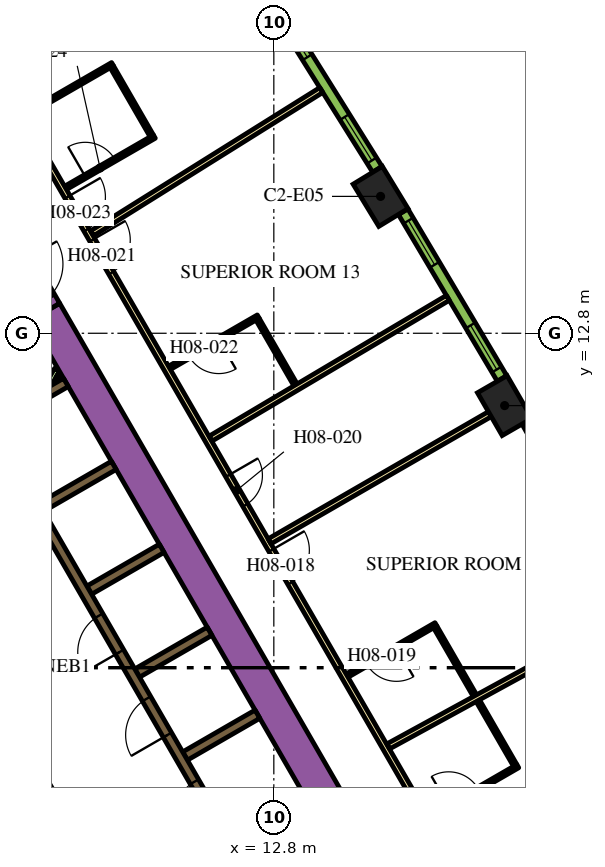
"""IFC4 building model, lengths in metres.
Left out: names, types, materials, properties, quantities, classifications, styles, units other than length and angle.
Written with IfcOpenShell. Run it as: python <this file> out.ifc"""

import sys

from ifc_helpers import new_model, si_unit, direction, frame, frame_2d, origin, origin_2d, place, context, subcontext, project, spatial, polyline, rectangle, outline, extrude, element, fill, save


model = new_model("IFC4")
c1 = context("Model", 3, precision=1e-05, world=origin(), true_north=direction((0.0, 1.0)))
c2 = subcontext(c1, "Body", "Model", "MODEL_VIEW")
j1 = project(units=[si_unit("LENGTHUNIT", "METRE"), si_unit("PLANEANGLEUNIT", "RADIAN")], contexts=[c1])
p1 = place(None, origin())
s1 = spatial("IfcSite", under=j1, at=p1, CompositionType="ELEMENT")
p2 = place(p1, origin())
s2 = spatial("IfcBuilding", under=s1, at=p2, CompositionType="ELEMENT")
p3 = place(p2, frame((0.0, 0.0, 114.9)))
s3 = spatial("IfcBuildingStorey", under=s2, at=p3, CompositionType="ELEMENT", Elevation=114.9)
for number, where, z_axis, x_axis in (
    (1, (18.874, 10.897, 0.0), (0.0, 0.0, 1.0), (-0.5, 0.866, 0.0)),
    (2, (15.609, 16.402, 0.0), (0.0, 0.0, 1.0), (-0.52, 0.854, 0.0)),
):
    element("IfcColumn", number, at=place(p3, frame(where, z_axis=z_axis, x_axis=x_axis)), inside=s3, PredefinedType="COLUMN", context=c2, shape_type="SweptSolid", body=[
        extrude(rectangle(XDim=1.3, YDim=0.9, at=origin_2d()), origin(), (0.0, 0.0, 1.0), 3.9),
    ])
p4 = place(p3, frame((6.776, 13.364, 0.0), z_axis=(0.0, 0.0, 1.0), x_axis=(0.500004177138, -0.8660229921, 0.0)))
e3 = element("IfcWall", 3, at=p4, inside=s3, PredefinedType="SOLIDWALL", context=c2, shape_type="SweptSolid", body=[
    extrude(rectangle(XDim=20.204, YDim=0.9, at=frame_2d((10.102, 0.0))), origin(), (0.0, 0.0, 1.0), 3.9),
])
for number, where, z_axis, x_axis in (
    (4, (10.464, 1.677, 0.0), (0.0, 0.0, 1.0), (0.866, 0.5, 0.0)),
    (5, (9.204, 3.859, 0.0), (0.0, 0.0, 1.0), (0.866, 0.5, 0.0)),
    (6, (7.944, 6.041, 0.0), (0.0, 0.0, 1.0), (0.866, 0.5, 0.0)),
    (7, (6.684, 8.224, 0.0), (0.0, 0.0, 1.0), (0.866, 0.5, 0.0)),
):
    element("IfcWall", number, at=place(p3, frame(where, z_axis=z_axis, x_axis=x_axis)), inside=s3, PredefinedType="SOLIDWALL", context=c2, shape_type="SweptSolid", body=[
        extrude(rectangle(XDim=2.2, YDim=0.25, at=frame_2d((1.1, 0.0))), origin(), (0.0, 0.0, 1.0), 3.9),
    ])
p5 = place(p3, origin())
e8 = element("IfcWall", 8, at=p5, inside=s3, PredefinedType="SOLIDWALL", context=c2, shape_type="SweptSolid", body=[
    extrude(outline(polyline([(5.27, 10.173), (5.27, 10.173), (4.683, 9.834), (4.504, 9.731), (4.442, 9.839), (4.431, 9.856), (4.419, 9.871), (4.406, 9.885), (4.39, 9.898), (4.374, 9.909), (4.357, 9.918), (4.341, 9.925), (7.266, 11.614), (7.391, 11.398), (5.486, 10.298), (5.486, 10.298), (5.27, 10.173), (5.27, 10.173)])), origin(), (0.0, 0.0, 1.0), 3.9),
])
p6 = place(p3, frame((6.872, 11.45, 0.0), z_axis=(0.0, 0.0, 1.0), x_axis=(0.499846793097, 0.866113839764, 0.0)))
e9 = element("IfcWall", 9, at=p6, inside=s3, PredefinedType="PARTITIONING", context=c2, shape_type="SweptSolid", body=[
    extrude(rectangle(XDim=0.453, YDim=0.15, at=frame_2d((0.227, 0.0))), origin(), (0.0, 0.0, 1.0), 2.75),
])
p7 = place(p3, frame((7.131, 11.6, 0.0), z_axis=(0.0, 0.0, 1.0), x_axis=(0.498600033135, 0.866832167699, 0.0)))
e10 = element("IfcWall", 10, at=p7, inside=s3, PredefinedType="PARTITIONING", context=c2, shape_type="SweptSolid", body=[
    extrude(rectangle(XDim=0.107, YDim=0.15, at=frame_2d((0.053, 0.0))), origin(), (0.0, 0.0, 1.0), 2.75),
])
p8 = place(p3, frame((11.553, -0.46, 0.0), z_axis=(0.0, 0.0, 1.0), x_axis=(-0.500006514828, 0.866021642414, 0.0)))
e11 = element("IfcWall", 11, at=p8, inside=s3, PredefinedType="SOLIDWALL", context=c2, shape_type="SweptSolid", body=[
    extrude(rectangle(XDim=12.35, YDim=0.25, at=frame_2d((6.175, 0.0))), origin(), (0.0, 0.0, 1.0), 3.9),
])
p9 = place(p8, frame((0.585, 0.0, 0.0)))
e12 = element("IfcOpeningElement", 12, at=p9, cuts=e11, PredefinedType="OPENING", context=c2, shape_type="SweptSolid", body=[
    extrude(rectangle(XDim=1.1, YDim=2.1, at=frame_2d((0.55, 1.05))), frame((0.0, 0.135, 0.0), z_axis=(0.0, -1.0, 0.0), x_axis=(1.0, 0.0, 0.0)), (0.0, 0.0, 1.0), 0.27),
])
p10 = place(p8, frame((3.105, 0.0, 0.0)))
e13 = element("IfcOpeningElement", 13, at=p10, cuts=e11, PredefinedType="OPENING", context=c2, shape_type="SweptSolid", body=[
    extrude(rectangle(XDim=1.1, YDim=2.1, at=frame_2d((0.55, 1.05))), frame((0.0, 0.135, 0.0), z_axis=(0.0, -1.0, 0.0), x_axis=(1.0, 0.0, 0.0)), (0.0, 0.0, 1.0), 0.27),
])
p11 = place(p8, frame((5.625, 0.0, 0.0)))
e14 = element("IfcOpeningElement", 14, at=p11, cuts=e11, PredefinedType="OPENING", context=c2, shape_type="SweptSolid", body=[
    extrude(rectangle(XDim=1.1, YDim=2.1, at=frame_2d((0.55, 1.05))), frame((0.0, 0.135, 0.0), z_axis=(0.0, -1.0, 0.0), x_axis=(1.0, 0.0, 0.0)), (0.0, 0.0, 1.0), 0.27),
])
p12 = place(p3, frame((8.565, -2.185, 0.0), z_axis=(0.0, 0.0, 1.0), x_axis=(-0.499997954832, 0.866026584559, 0.0)))
e15 = element("IfcWall", 15, at=p12, inside=s3, PredefinedType="SOLIDWALL", context=c2, shape_type="SweptSolid", body=[
    extrude(rectangle(XDim=12.35, YDim=0.25, at=frame_2d((6.175, 0.0))), origin(), (0.0, 0.0, 1.0), 3.9),
])
p13 = place(p12, frame((5.725, 0.0, 0.0)))
e16 = element("IfcOpeningElement", 16, at=p13, cuts=e15, PredefinedType="OPENING", context=c2, shape_type="SweptSolid", body=[
    extrude(rectangle(XDim=0.9, YDim=2.1, at=frame_2d((0.45, 1.05))), frame((0.0, 0.135, 0.0), z_axis=(0.0, -1.0, 0.0), x_axis=(1.0, 0.0, 0.0)), (0.0, 0.0, 1.0), 0.27),
])
p14 = place(p3, frame((5.926, 14.836, 0.0), z_axis=(0.0, 0.0, 1.0), x_axis=(0.500062241894, -0.865989465428, 0.0)))
e17 = element("IfcWall", 17, at=p14, inside=s3, PredefinedType="SOLIDWALL", context=c2, shape_type="SweptSolid", body=[
    extrude(rectangle(XDim=1.7, YDim=0.9, at=frame_2d((0.85, 0.0))), origin(), (0.0, 0.0, 1.0), 3.9),
])
p15 = place(p14, frame((0.25, 0.0, 0.0)))
e18 = element("IfcOpeningElement", 18, at=p15, cuts=e17, PredefinedType="OPENING", context=c2, shape_type="SweptSolid", body=[
    extrude(rectangle(XDim=1.2, YDim=2.1, at=frame_2d((0.6, 1.05))), frame((0.0, 0.46, 0.0), z_axis=(0.0, -1.0, 0.0), x_axis=(1.0, 0.0, 0.0)), (0.0, 0.0, 1.0), 0.92),
])
p16 = place(p3, frame((6.163, 18.475, 0.0), z_axis=(0.0, 0.0, 1.0), x_axis=(0.500001317485, -0.866024643133, 0.0)))
e19 = element("IfcWall", 19, at=p16, inside=s3, PredefinedType="PARTITIONING", context=c2, shape_type="SweptSolid", body=[
    extrude(rectangle(XDim=25.767, YDim=0.15, at=frame_2d((12.883, 0.0))), origin(), (0.0, 0.0, 1.0), 2.75),
])
p17 = place(p16, frame((24.241, 0.0, 0.0)))
e20 = element("IfcOpeningElement", 20, at=p17, cuts=e19, PredefinedType="OPENING", context=c2, shape_type="SweptSolid", body=[
    extrude(rectangle(XDim=1.0, YDim=2.1, at=frame_2d((0.5, 1.05))), frame((0.0, 0.085, 0.0), z_axis=(0.0, -1.0, 0.0), x_axis=(1.0, 0.0, 0.0)), (0.0, 0.0, 1.0), 0.17),
])
p18 = place(p16, frame((13.144, 0.0, 0.0)))
e21 = element("IfcOpeningElement", 21, at=p18, cuts=e19, PredefinedType="OPENING", context=c2, shape_type="SweptSolid", body=[
    extrude(rectangle(XDim=1.0, YDim=2.1, at=frame_2d((0.5, 1.05))), frame((0.0, 0.085, 0.0), z_axis=(0.0, -1.0, 0.0), x_axis=(1.0, 0.0, 0.0)), (0.0, 0.0, 1.0), 0.17),
])
p19 = place(p16, frame((10.874, 0.0, 0.0)))
e22 = element("IfcOpeningElement", 22, at=p19, cuts=e19, PredefinedType="OPENING", context=c2, shape_type="SweptSolid", body=[
    extrude(rectangle(XDim=0.9, YDim=2.1, at=frame_2d((0.45, 1.05))), frame((0.0, 0.085, 0.0), z_axis=(0.0, -1.0, 0.0), x_axis=(1.0, 0.0, 0.0)), (0.0, 0.0, 1.0), 0.17),
])
p20 = place(p16, frame((3.718, 0.0, 0.0)))
e23 = element("IfcOpeningElement", 23, at=p20, cuts=e19, PredefinedType="OPENING", context=c2, shape_type="SweptSolid", body=[
    extrude(rectangle(XDim=1.0, YDim=2.1, at=frame_2d((0.5, 1.05))), frame((0.0, 0.085, 0.0), z_axis=(0.0, -1.0, 0.0), x_axis=(1.0, 0.0, 0.0)), (0.0, 0.0, 1.0), 0.17),
])
p21 = place(p16, frame((2.411, 0.0, 0.0)))
e24 = element("IfcOpeningElement", 24, at=p21, cuts=e19, PredefinedType="OPENING", context=c2, shape_type="SweptSolid", body=[
    extrude(rectangle(XDim=1.0, YDim=2.1, at=frame_2d((0.5, 1.05))), frame((0.0, 0.085, 0.0), z_axis=(0.0, -1.0, 0.0), x_axis=(1.0, 0.0, 0.0)), (0.0, 0.0, 1.0), 0.17),
])
p22 = place(p3, frame((10.592, 24.589, 0.0), z_axis=(0.0, 0.0, 1.0), x_axis=(-0.835337323748, -0.549737715236, 0.0)))
e25 = element("IfcWall", 25, at=p22, inside=s3, PredefinedType="PARTITIONING", context=c2, shape_type="SweptSolid", body=[
    extrude(rectangle(XDim=10.875, YDim=0.15, at=frame_2d((5.438, 0.0))), origin(), (0.0, 0.0, 1.0), 2.75),
])
p23 = place(p3, frame((14.049, 19.2, 0.0), z_axis=(0.0, 0.0, 1.0), x_axis=(-0.847955867271, -0.530066832731, 0.0)))
e26 = element("IfcWall", 26, at=p23, inside=s3, PredefinedType="PARTITIONING", context=c2, shape_type="SweptSolid", body=[
    extrude(rectangle(XDim=7.111, YDim=0.15, at=frame_2d((3.556, 0.0))), origin(), (0.0, 0.0, 1.0), 2.75),
])
p24 = place(p3, frame((17.379, 13.731, 0.0), z_axis=(0.0, 0.0, 1.0), x_axis=(-0.860132461691, -0.510070728768, 0.0)))
e27 = element("IfcWall", 27, at=p24, inside=s3, PredefinedType="PARTITIONING", context=c2, shape_type="SweptSolid", body=[
    extrude(rectangle(XDim=7.257, YDim=0.15, at=frame_2d((3.628, 0.0))), origin(), (0.0, 0.0, 1.0), 2.75),
])
p25 = place(p3, frame((18.484, 10.672, 0.0), z_axis=(0.0, 0.0, 1.0), x_axis=(-0.866019162053, -0.50001081084, 0.0)))
e28 = element("IfcWall", 28, at=p25, inside=s3, PredefinedType="PARTITIONING", context=c2, shape_type="SweptSolid", body=[
    extrude(rectangle(XDim=6.694, YDim=0.15, at=frame_2d((3.347, 0.0))), origin(), (0.0, 0.0, 1.0), 2.75),
])
p26 = place(p3, frame((21.614, 5.102, 0.0), z_axis=(0.0, 0.0, 1.0), x_axis=(-0.877484555087, -0.479604895287, 0.0)))
e29 = element("IfcWall", 29, at=p26, inside=s3, PredefinedType="PARTITIONING", context=c2, shape_type="SweptSolid", body=[
    extrude(rectangle(XDim=6.611, YDim=0.15, at=frame_2d((3.306, 0.0))), origin(), (0.0, 0.0, 1.0), 2.75),
])
p27 = place(p3, frame((16.881, 0.061, 0.0), z_axis=(0.0, 0.0, 1.0), x_axis=(0.866019956843, 0.50000943426, 0.0)))
e30 = element("IfcWall", 30, at=p27, inside=s3, PredefinedType="PARTITIONING", context=c2, shape_type="SweptSolid", body=[
    extrude(rectangle(XDim=2.7, YDim=0.1, at=frame_2d((1.35, 0.0))), origin(), (0.0, 0.0, 1.0), 2.75),
])
p28 = place(p27, frame((0.6, 0.0, 0.0)))
e31 = element("IfcOpeningElement", 31, at=p28, cuts=e30, PredefinedType="OPENING", context=c2, shape_type="SweptSolid", body=[
    extrude(rectangle(XDim=0.9, YDim=2.1, at=frame_2d((0.45, 1.05))), frame((0.0, 0.06, 0.0), z_axis=(0.0, -1.0, 0.0), x_axis=(1.0, 0.0, 0.0)), (0.0, 0.0, 1.0), 0.12),
])
p29 = place(p3, frame((19.151, 1.429, 0.0), z_axis=(0.0, 0.0, 1.0), x_axis=(-0.500024377727, 0.866011328839, 0.0)))
e32 = element("IfcWall", 32, at=p29, inside=s3, PredefinedType="PARTITIONING", context=c2, shape_type="SweptSolid", body=[
    extrude(rectangle(XDim=1.96, YDim=0.1, at=frame_2d((0.98, 0.0))), origin(), (0.0, 0.0, 1.0), 2.75),
])
p30 = place(p3, frame((17.066, 5.141, 0.0), z_axis=(0.0, 0.0, 1.0), x_axis=(-0.866059108428, -0.4999416173, 0.0)))
e33 = element("IfcWall", 33, at=p30, inside=s3, PredefinedType="PARTITIONING", context=c2, shape_type="SweptSolid", body=[
    extrude(rectangle(XDim=2.7, YDim=0.1, at=frame_2d((1.35, 0.0))), origin(), (0.0, 0.0, 1.0), 2.75),
])
p31 = place(p30, frame((1.2, 0.0, 0.0)))
e34 = element("IfcOpeningElement", 34, at=p31, cuts=e33, PredefinedType="OPENING", context=c2, shape_type="SweptSolid", body=[
    extrude(rectangle(XDim=0.9, YDim=2.1, at=frame_2d((0.45, 1.05))), frame((0.0, 0.06, 0.0), z_axis=(0.0, -1.0, 0.0), x_axis=(1.0, 0.0, 0.0)), (0.0, 0.0, 1.0), 0.12),
])
p32 = place(p3, frame((17.047, 5.073, 0.0), z_axis=(0.0, 0.0, 1.0), x_axis=(0.500008976872, -0.866020220923, 0.0)))
e35 = element("IfcWall", 35, at=p32, inside=s3, PredefinedType="PARTITIONING", context=c2, shape_type="SweptSolid", body=[
    extrude(rectangle(XDim=2.09, YDim=0.1, at=frame_2d((1.045, 0.0))), origin(), (0.0, 0.0, 1.0), 2.75),
])
p33 = place(p3, frame((12.39, 13.239, 0.0), z_axis=(0.0, 0.0, 1.0), x_axis=(-0.866036505625, -0.499980770555, 0.0)))
e36 = element("IfcWall", 36, at=p33, inside=s3, PredefinedType="PARTITIONING", context=c2, shape_type="SweptSolid", body=[
    extrude(rectangle(XDim=2.7, YDim=0.1, at=frame_2d((1.35, 0.0))), origin(), (0.0, 0.0, 1.0), 2.75),
])
p34 = place(p33, frame((1.2, 0.0, 0.0)))
e37 = element("IfcOpeningElement", 37, at=p34, cuts=e36, PredefinedType="OPENING", context=c2, shape_type="SweptSolid", body=[
    extrude(rectangle(XDim=0.9, YDim=2.1, at=frame_2d((0.45, 1.05))), frame((0.0, 0.06, 0.0), z_axis=(0.0, -1.0, 0.0), x_axis=(1.0, 0.0, 0.0)), (0.0, 0.0, 1.0), 0.12),
])
p35 = place(p3, frame((12.372, 13.171, 0.0), z_axis=(0.0, 0.0, 1.0), x_axis=(0.500044573643, -0.86599966765, 0.0)))
e38 = element("IfcWall", 38, at=p35, inside=s3, PredefinedType="PARTITIONING", context=c2, shape_type="SweptSolid", body=[
    extrude(rectangle(XDim=1.99, YDim=0.1, at=frame_2d((0.995, 0.0))), origin(), (0.0, 0.0, 1.0), 2.75),
])
p36 = place(p3, frame((7.318, 16.625, 0.0), z_axis=(0.0, 0.0, 1.0), x_axis=(0.866019956843, 0.50000943426, 0.0)))
e39 = element("IfcWall", 39, at=p36, inside=s3, PredefinedType="PARTITIONING", context=c2, shape_type="SweptSolid", body=[
    extrude(rectangle(XDim=2.7, YDim=0.1, at=frame_2d((1.35, 0.0))), origin(), (0.0, 0.0, 1.0), 2.75),
])
p37 = place(p36, frame((0.6, 0.0, 0.0)))
e40 = element("IfcOpeningElement", 40, at=p37, cuts=e39, PredefinedType="OPENING", context=c2, shape_type="SweptSolid", body=[
    extrude(rectangle(XDim=0.9, YDim=2.1, at=frame_2d((0.45, 1.05))), frame((0.0, 0.06, 0.0), z_axis=(0.0, -1.0, 0.0), x_axis=(1.0, 0.0, 0.0)), (0.0, 0.0, 1.0), 0.12),
])
p38 = place(p3, frame((9.588, 17.993, 0.0), z_axis=(0.0, 0.0, 1.0), x_axis=(-0.500027713859, 0.866009402589, 0.0)))
e41 = element("IfcWall", 41, at=p38, inside=s3, PredefinedType="PARTITIONING", context=c2, shape_type="SweptSolid", body=[
    extrude(rectangle(XDim=2.1, YDim=0.1, at=frame_2d((1.05, 0.0))), origin(), (0.0, 0.0, 1.0), 2.75),
])
p39 = place(p3, frame((6.218, 18.53, 0.0), z_axis=(0.0, 0.0, 1.0), x_axis=(0.86599734893, 0.500048589285, 0.0)))
e42 = element("IfcWall", 42, at=p39, inside=s3, PredefinedType="PARTITIONING", context=c2, shape_type="SweptSolid", body=[
    extrude(rectangle(XDim=2.7, YDim=0.1, at=frame_2d((1.35, 0.0))), origin(), (0.0, 0.0, 1.0), 2.75),
])
p40 = place(p3, frame((21.956, 6.033, 0.0), z_axis=(0.0, 0.0, 1.0), x_axis=(-0.48983164787, 0.87181704316, 0.0)))
e43 = element("IfcWall", 43, at=p40, inside=s3, PredefinedType="SOLIDWALL", context=c2, shape_type="SweptSolid", body=[
    extrude(rectangle(XDim=5.1, YDim=0.29, at=frame_2d((2.55, 0.0))), origin(), (0.0, 0.0, 1.0), 3.65),
])
p41 = place(p40, frame((0.273, 0.0, 0.9)))
e44 = element("IfcOpeningElement", 44, at=p41, cuts=e43, PredefinedType="OPENING", context=c2, shape_type="SweptSolid", body=[
    extrude(rectangle(XDim=1.35, YDim=2.15, at=frame_2d((0.675, 1.075))), frame((0.0, 0.155, 0.0), z_axis=(0.0, -1.0, 0.0), x_axis=(1.0, 0.0, 0.0)), (0.0, 0.0, 1.0), 0.31),
])
p42 = place(p40, frame((3.478, 0.0, 0.9)))
e45 = element("IfcOpeningElement", 45, at=p42, cuts=e43, PredefinedType="OPENING", context=c2, shape_type="SweptSolid", body=[
    extrude(rectangle(XDim=1.35, YDim=2.15, at=frame_2d((0.675, 1.075))), frame((0.0, 0.155, 0.0), z_axis=(0.0, -1.0, 0.0), x_axis=(1.0, 0.0, 0.0)), (0.0, 0.0, 1.0), 0.31),
])
p43 = place(p3, frame((18.805, 11.611, 0.0), z_axis=(0.0, 0.0, 1.0), x_axis=(-0.510054281659, 0.860142214847, 0.0)))
e46 = element("IfcWall", 46, at=p43, inside=s3, PredefinedType="SOLIDWALL", context=c2, shape_type="SweptSolid", body=[
    extrude(rectangle(XDim=5.101, YDim=0.29, at=frame_2d((2.55, 0.0))), origin(), (0.0, 0.0, 1.0), 3.65),
])
p44 = place(p43, frame((0.273, 0.0, 0.9)))
e47 = element("IfcOpeningElement", 47, at=p44, cuts=e46, PredefinedType="OPENING", context=c2, shape_type="SweptSolid", body=[
    extrude(rectangle(XDim=1.35, YDim=2.15, at=frame_2d((0.675, 1.075))), frame((0.0, 0.155, 0.0), z_axis=(0.0, -1.0, 0.0), x_axis=(1.0, 0.0, 0.0)), (0.0, 0.0, 1.0), 0.31),
])
p45 = place(p43, frame((3.478, 0.0, 0.9)))
e48 = element("IfcOpeningElement", 48, at=p45, cuts=e46, PredefinedType="OPENING", context=c2, shape_type="SweptSolid", body=[
    extrude(rectangle(XDim=1.35, YDim=2.15, at=frame_2d((0.675, 1.075))), frame((0.0, 0.155, 0.0), z_axis=(0.0, -1.0, 0.0), x_axis=(1.0, 0.0, 0.0)), (0.0, 0.0, 1.0), 0.31),
])
p46 = place(p3, frame((15.524, 17.114, 0.0), z_axis=(0.0, 0.0, 1.0), x_axis=(-0.530072082134, 0.847952585787, 0.0)))
e49 = element("IfcWall", 49, at=p46, inside=s3, PredefinedType="SOLIDWALL", context=c2, shape_type="SweptSolid", body=[
    extrude(rectangle(XDim=5.1, YDim=0.29, at=frame_2d((2.55, 0.0))), origin(), (0.0, 0.0, 1.0), 3.65),
])
p47 = place(p46, frame((0.273, 0.0, 0.9)))
e50 = element("IfcOpeningElement", 50, at=p47, cuts=e49, PredefinedType="OPENING", context=c2, shape_type="SweptSolid", body=[
    extrude(rectangle(XDim=1.35, YDim=2.15, at=frame_2d((0.675, 1.075))), frame((0.0, 0.155, 0.0), z_axis=(0.0, -1.0, 0.0), x_axis=(1.0, 0.0, 0.0)), (0.0, 0.0, 1.0), 0.31),
])
p48 = place(p46, frame((3.478, 0.0, 0.9)))
e51 = element("IfcOpeningElement", 51, at=p48, cuts=e49, PredefinedType="OPENING", context=c2, shape_type="SweptSolid", body=[
    extrude(rectangle(XDim=1.35, YDim=2.15, at=frame_2d((0.675, 1.075))), frame((0.0, 0.155, 0.0), z_axis=(0.0, -1.0, 0.0), x_axis=(1.0, 0.0, 0.0)), (0.0, 0.0, 1.0), 0.31),
])
p49 = place(p9, origin())
e52 = element("IfcDoor", 52, at=p49, inside=s3, OperationType="DOUBLE_DOOR_SLIDING", PredefinedType="DOOR", context=c2, shape_type="SweptSolid", body=[
    extrude(rectangle(XDim=1.1, YDim=2.1, at=frame_2d((0.55, 1.05))), frame((0.0, 0.025, 0.0), z_axis=(0.0, -1.0, 0.0), x_axis=(1.0, 0.0, 0.0)), (0.0, 0.0, 1.0), 0.05),
])
fill(e12, e52)
p50 = place(p10, origin())
e53 = element("IfcDoor", 53, at=p50, inside=s3, OperationType="DOUBLE_DOOR_SLIDING", PredefinedType="DOOR", context=c2, shape_type="SweptSolid", body=[
    extrude(rectangle(XDim=1.1, YDim=2.1, at=frame_2d((0.55, 1.05))), frame((0.0, 0.025, 0.0), z_axis=(0.0, -1.0, 0.0), x_axis=(1.0, 0.0, 0.0)), (0.0, 0.0, 1.0), 0.05),
])
fill(e13, e53)
p51 = place(p11, origin())
e54 = element("IfcDoor", 54, at=p51, inside=s3, OperationType="DOUBLE_DOOR_SLIDING", PredefinedType="DOOR", context=c2, shape_type="SweptSolid", body=[
    extrude(rectangle(XDim=1.1, YDim=2.1, at=frame_2d((0.55, 1.05))), frame((0.0, 0.025, 0.0), z_axis=(0.0, -1.0, 0.0), x_axis=(1.0, 0.0, 0.0)), (0.0, 0.0, 1.0), 0.05),
])
fill(e14, e54)
p52 = place(p18, origin())
e55 = element("IfcDoor", 55, at=p52, inside=s3, OperationType="SINGLE_SWING_LEFT", PredefinedType="DOOR", context=c2, shape_type="SweptSolid", body=[
    extrude(rectangle(XDim=1.0, YDim=2.1, at=frame_2d((0.5, 1.05))), frame((0.0, 0.025, 0.0), z_axis=(0.0, -1.0, 0.0), x_axis=(1.0, 0.0, 0.0)), (0.0, 0.0, 1.0), 0.05),
])
fill(e21, e55)
p53 = place(p31, origin())
e56 = element("IfcDoor", 56, at=p53, inside=s3, OperationType="SINGLE_SWING_LEFT", PredefinedType="DOOR", context=c2, shape_type="SweptSolid", body=[
    extrude(rectangle(XDim=0.9, YDim=2.1, at=frame_2d((0.45, 1.05))), frame((0.0, 0.025, 0.0), z_axis=(0.0, -1.0, 0.0), x_axis=(1.0, 0.0, 0.0)), (0.0, 0.0, 1.0), 0.05),
])
fill(e34, e56)
p54 = place(p19, origin())
e57 = element("IfcDoor", 57, at=p54, inside=s3, OperationType="SINGLE_SWING_RIGHT", PredefinedType="DOOR", context=c2, shape_type="SweptSolid", body=[
    extrude(rectangle(XDim=0.9, YDim=2.1, at=frame_2d((0.45, 1.05))), frame((0.0, 0.025, 0.0), z_axis=(0.0, -1.0, 0.0), x_axis=(1.0, 0.0, 0.0)), (0.0, 0.0, 1.0), 0.05),
])
fill(e22, e57)
p55 = place(p20, origin())
e58 = element("IfcDoor", 58, at=p55, inside=s3, OperationType="SINGLE_SWING_LEFT", PredefinedType="DOOR", context=c2, shape_type="SweptSolid", body=[
    extrude(rectangle(XDim=1.0, YDim=2.1, at=frame_2d((0.5, 1.05))), frame((0.0, 0.025, 0.0), z_axis=(0.0, -1.0, 0.0), x_axis=(1.0, 0.0, 0.0)), (0.0, 0.0, 1.0), 0.05),
])
fill(e23, e58)
p56 = place(p34, origin())
e59 = element("IfcDoor", 59, at=p56, inside=s3, OperationType="SINGLE_SWING_LEFT", PredefinedType="DOOR", context=c2, shape_type="SweptSolid", body=[
    extrude(rectangle(XDim=0.9, YDim=2.1, at=frame_2d((0.45, 1.05))), frame((0.0, 0.025, 0.0), z_axis=(0.0, -1.0, 0.0), x_axis=(1.0, 0.0, 0.0)), (0.0, 0.0, 1.0), 0.05),
])
fill(e37, e59)
p57 = place(p21, origin())
e60 = element("IfcDoor", 60, at=p57, inside=s3, OperationType="SINGLE_SWING_RIGHT", PredefinedType="DOOR", context=c2, shape_type="SweptSolid", body=[
    extrude(rectangle(XDim=1.0, YDim=2.1, at=frame_2d((0.5, 1.05))), frame((0.0, 0.025, 0.0), z_axis=(0.0, -1.0, 0.0), x_axis=(1.0, 0.0, 0.0)), (0.0, 0.0, 1.0), 0.05),
])
fill(e24, e60)
p58 = place(p37, origin())
e61 = element("IfcDoor", 61, at=p58, inside=s3, OperationType="SINGLE_SWING_LEFT", PredefinedType="DOOR", context=c2, shape_type="SweptSolid", body=[
    extrude(rectangle(XDim=0.9, YDim=2.1, at=frame_2d((0.45, 1.05))), frame((0.0, 0.025, 0.0), z_axis=(0.0, -1.0, 0.0), x_axis=(1.0, 0.0, 0.0)), (0.0, 0.0, 1.0), 0.05),
])
fill(e40, e61)
p59 = place(p44, origin())
e62 = element("IfcWindow", 62, at=p59, inside=s3, PartitioningType="DOUBLE_PANEL_VERTICAL", PredefinedType="WINDOW", context=c2, shape_type="SweptSolid", body=[
    extrude(rectangle(XDim=1.35, YDim=2.15, at=frame_2d((0.675, 1.075))), frame((0.0, 0.015, 0.0), z_axis=(0.0, -1.0, 0.0), x_axis=(1.0, 0.0, 0.0)), (0.0, 0.0, 1.0), 0.06),
])
fill(e47, e62)
p60 = place(p45, origin())
e63 = element("IfcWindow", 63, at=p60, inside=s3, PartitioningType="DOUBLE_PANEL_VERTICAL", PredefinedType="WINDOW", context=c2, shape_type="SweptSolid", body=[
    extrude(rectangle(XDim=1.35, YDim=2.15, at=frame_2d((0.675, 1.075))), frame((0.0, 0.015, 0.0), z_axis=(0.0, -1.0, 0.0), x_axis=(1.0, 0.0, 0.0)), (0.0, 0.0, 1.0), 0.06),
])
fill(e48, e63)
p61 = place(p47, origin())
e64 = element("IfcWindow", 64, at=p61, inside=s3, PartitioningType="DOUBLE_PANEL_VERTICAL", PredefinedType="WINDOW", context=c2, shape_type="SweptSolid", body=[
    extrude(rectangle(XDim=1.35, YDim=2.15, at=frame_2d((0.675, 1.075))), frame((0.0, 0.015, 0.0), z_axis=(0.0, -1.0, 0.0), x_axis=(1.0, 0.0, 0.0)), (0.0, 0.0, 1.0), 0.06),
])
fill(e50, e64)
p62 = place(p48, origin())
e65 = element("IfcWindow", 65, at=p62, inside=s3, PartitioningType="DOUBLE_PANEL_VERTICAL", PredefinedType="WINDOW", context=c2, shape_type="SweptSolid", body=[
    extrude(rectangle(XDim=1.35, YDim=2.15, at=frame_2d((0.675, 1.075))), frame((0.0, 0.015, 0.0), z_axis=(0.0, -1.0, 0.0), x_axis=(1.0, 0.0, 0.0)), (0.0, 0.0, 1.0), 0.06),
])
fill(e51, e65)
save(model, sys.argv[1])
